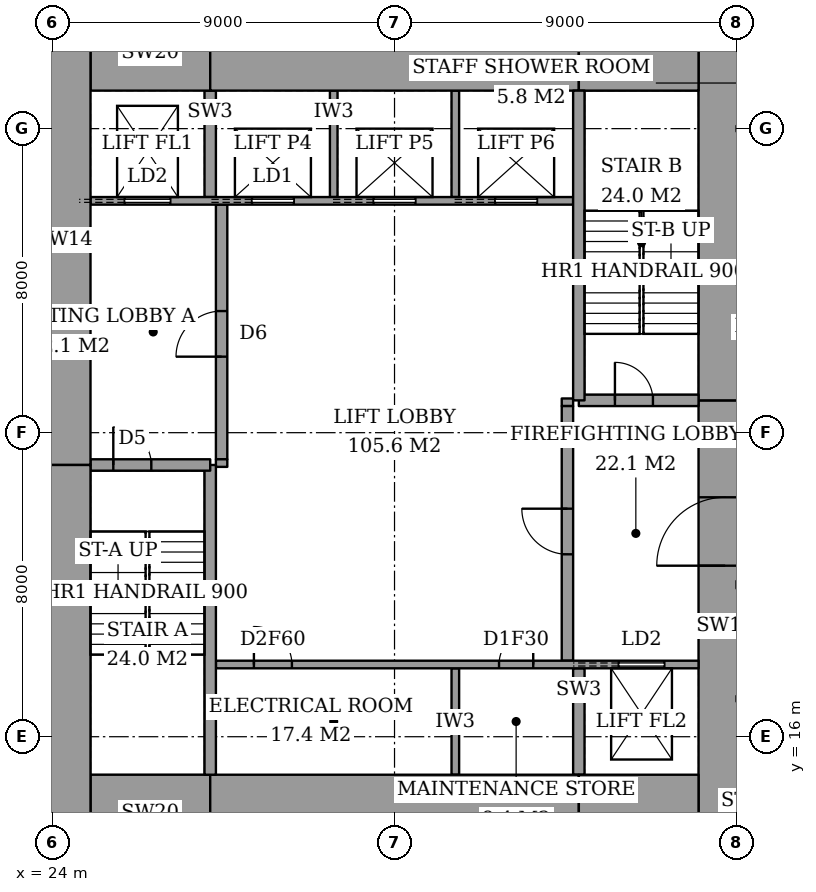
"""IFC4 building model, lengths in metres.
Left out: names, types, materials, properties, quantities, classifications, styles, units other than length and angle.
Written with IfcOpenShell. Run it as: python <this file> out.ifc"""

import sys

from ifc_helpers import new_model, si_unit, direction, frame, frame_2d, origin, place, context, subcontext, project, spatial, rectangle, extrude, element, fill, save


model = new_model("IFC4")
c1 = context("Model", 3, precision=1e-05, world=origin(), true_north=direction((0.0, 1.0)))
c2 = subcontext(c1, "Body", "Model", "MODEL_VIEW")
j1 = project(units=[si_unit("LENGTHUNIT", "METRE"), si_unit("PLANEANGLEUNIT", "RADIAN")], contexts=[c1])
p1 = place(None, origin())
s1 = spatial("IfcSite", under=j1, at=p1, CompositionType="ELEMENT")
p2 = place(p1, origin())
s2 = spatial("IfcBuilding", under=s1, at=p2, CompositionType="ELEMENT")
p3 = place(p2, frame((0.0, 0.0, 287.1)))
s3 = spatial("IfcBuildingStorey", under=s2, at=p3, CompositionType="ELEMENT", Elevation=287.1)
p4 = place(p3, frame((25.0, 14.0, 0.0), z_axis=(0.0, 0.0, 1.0), x_axis=(1.0, 0.0, 0.0)))
e1 = element("IfcWall", 1, at=p4, inside=s3, PredefinedType="SHEAR", context=c2, shape_type="SweptSolid", body=[
    extrude(rectangle(XDim=3.15, YDim=2.0, at=frame_2d((1.575, 0.0))), origin(), (0.0, 0.0, 1.0), 4.5),
])
p5 = place(p3, frame((28.15, 14.0, 0.0), z_axis=(0.0, 0.0, 1.0), x_axis=(1.0, 0.0, 0.0)))
e2 = element("IfcWall", 2, at=p5, inside=s3, PredefinedType="SHEAR", context=c2, shape_type="SweptSolid", body=[
    extrude(rectangle(XDim=9.7, YDim=2.0, at=frame_2d((4.85, 0.0))), origin(), (0.0, 0.0, 1.0), 4.5),
])
for number, where, z_axis, x_axis in (
    (3, (37.85, 14.0, 0.0), (0.0, 0.0, 1.0), (1.0, 0.0, 0.0)),
    (4, (25.0, 34.0, 0.0), (0.0, 0.0, 1.0), (1.0, 0.0, 0.0)),
):
    element("IfcWall", number, at=place(p3, frame(where, z_axis=z_axis, x_axis=x_axis)), inside=s3, PredefinedType="SHEAR", context=c2, shape_type="SweptSolid", body=[
        extrude(rectangle(XDim=3.15, YDim=2.0, at=frame_2d((1.575, 0.0))), origin(), (0.0, 0.0, 1.0), 4.5),
    ])
p6 = place(p3, frame((28.15, 34.0, 0.0), z_axis=(0.0, 0.0, 1.0), x_axis=(1.0, 0.0, 0.0)))
e5 = element("IfcWall", 5, at=p6, inside=s3, PredefinedType="SHEAR", context=c2, shape_type="SweptSolid", body=[
    extrude(rectangle(XDim=9.7, YDim=2.0, at=frame_2d((4.85, 0.0))), origin(), (0.0, 0.0, 1.0), 4.5),
])
p7 = place(p3, frame((37.85, 34.0, 0.0), z_axis=(0.0, 0.0, 1.0), x_axis=(1.0, 0.0, 0.0)))
e6 = element("IfcWall", 6, at=p7, inside=s3, PredefinedType="SHEAR", context=c2, shape_type="SweptSolid", body=[
    extrude(rectangle(XDim=3.15, YDim=2.0, at=frame_2d((1.575, 0.0))), origin(), (0.0, 0.0, 1.0), 4.5),
])
p8 = place(p3, frame((24.3, 13.0, 0.0), z_axis=(0.0, 0.0, 1.0), x_axis=(0.0, 1.0, 0.0)))
e7 = element("IfcWall", 7, at=p8, inside=s3, PredefinedType="SHEAR", context=c2, shape_type="SweptSolid", body=[
    extrude(rectangle(XDim=10.15, YDim=1.4, at=frame_2d((5.075, 0.0))), origin(), (0.0, 0.0, 1.0), 4.5),
])
p9 = place(p3, frame((24.3, 23.15, 0.0), z_axis=(0.0, 0.0, 1.0), x_axis=(0.0, 1.0, 0.0)))
e8 = element("IfcWall", 8, at=p9, inside=s3, PredefinedType="SHEAR", context=c2, shape_type="SweptSolid", body=[
    extrude(rectangle(XDim=11.85, YDim=1.4, at=frame_2d((5.925, 0.0))), origin(), (0.0, 0.0, 1.0), 4.5),
])
p10 = place(p3, frame((41.7, 13.0, 0.0), z_axis=(0.0, 0.0, 1.0), x_axis=(0.0, 1.0, 0.0)))
e9 = element("IfcWall", 9, at=p10, inside=s3, PredefinedType="SHEAR", context=c2, shape_type="SweptSolid", body=[
    extrude(rectangle(XDim=11.85, YDim=1.4, at=frame_2d((5.925, 0.0))), origin(), (0.0, 0.0, 1.0), 4.5),
])
p11 = place(p10, frame((7.5, 0.0, 0.0)))
e10 = element("IfcOpeningElement", 10, at=p11, cuts=e9, PredefinedType="OPENING", context=c2, shape_type="SweptSolid", body=[
    extrude(rectangle(XDim=1.8, YDim=2.4, at=frame_2d((0.9, 1.2))), frame((0.0, 0.71, 0.0), z_axis=(0.0, -1.0, 0.0), x_axis=(1.0, 0.0, 0.0)), (0.0, 0.0, 1.0), 1.42),
])
p12 = place(p3, frame((41.7, 24.85, 0.0), z_axis=(0.0, 0.0, 1.0), x_axis=(0.0, 1.0, 0.0)))
e11 = element("IfcWall", 11, at=p12, inside=s3, PredefinedType="SHEAR", context=c2, shape_type="SweptSolid", body=[
    extrude(rectangle(XDim=10.15, YDim=1.4, at=frame_2d((5.075, 0.0))), origin(), (0.0, 0.0, 1.0), 4.5),
])
p13 = place(p3, frame((28.15, 15.0, 0.0), z_axis=(0.0, 0.0, 1.0), x_axis=(0.0, 1.0, 0.0)))
e12 = element("IfcWall", 12, at=p13, inside=s3, PredefinedType="SHEAR", context=c2, shape_type="SweptSolid", body=[
    extrude(rectangle(XDim=8.15, YDim=0.3, at=frame_2d((4.075, 0.0))), origin(), (0.0, 0.0, 1.0), 4.5),
])
p14 = place(p3, frame((25.0, 23.15, 0.0), z_axis=(0.0, 0.0, 1.0), x_axis=(1.0, 0.0, 0.0)))
e13 = element("IfcWall", 13, at=p14, inside=s3, PredefinedType="SHEAR", context=c2, shape_type="SweptSolid", body=[
    extrude(rectangle(XDim=3.15, YDim=0.3, at=frame_2d((1.575, 0.0))), origin(), (0.0, 0.0, 1.0), 4.5),
])
p15 = place(p14, frame((0.6, 0.0, 0.0)))
e14 = element("IfcOpeningElement", 14, at=p15, cuts=e13, PredefinedType="OPENING", context=c2, shape_type="SweptSolid", body=[
    extrude(rectangle(XDim=1.0, YDim=2.1, at=frame_2d((0.5, 1.05))), frame((0.0, 0.16, 0.0), z_axis=(0.0, -1.0, 0.0), x_axis=(1.0, 0.0, 0.0)), (0.0, 0.0, 1.0), 0.32),
])
p16 = place(p3, frame((37.85, 24.85, 0.0), z_axis=(0.0, 0.0, 1.0), x_axis=(0.0, 1.0, 0.0)))
e15 = element("IfcWall", 15, at=p16, inside=s3, PredefinedType="SHEAR", context=c2, shape_type="SweptSolid", body=[
    extrude(rectangle(XDim=8.15, YDim=0.3, at=frame_2d((4.075, 0.0))), origin(), (0.0, 0.0, 1.0), 4.5),
])
p17 = place(p3, frame((37.85, 24.85, 0.0), z_axis=(0.0, 0.0, 1.0), x_axis=(1.0, 0.0, 0.0)))
e16 = element("IfcWall", 16, at=p17, inside=s3, PredefinedType="SHEAR", context=c2, shape_type="SweptSolid", body=[
    extrude(rectangle(XDim=3.15, YDim=0.3, at=frame_2d((1.575, 0.0))), origin(), (0.0, 0.0, 1.0), 4.5),
])
p18 = place(p17, frame((0.95, 0.0, 0.0)))
e17 = element("IfcOpeningElement", 17, at=p18, cuts=e16, PredefinedType="OPENING", context=c2, shape_type="SweptSolid", body=[
    extrude(rectangle(XDim=1.0, YDim=2.1, at=frame_2d((0.5, 1.05))), frame((0.0, 0.16, 0.0), z_axis=(0.0, -1.0, 0.0), x_axis=(1.0, 0.0, 0.0)), (0.0, 0.0, 1.0), 0.32),
])
p19 = place(p3, frame((28.45, 23.3, 0.0), z_axis=(0.0, 0.0, 1.0), x_axis=(0.0, 1.0, 0.0)))
e18 = element("IfcWall", 18, at=p19, inside=s3, PredefinedType="PARTITIONING", context=c2, shape_type="SweptSolid", body=[
    extrude(rectangle(XDim=6.7, YDim=0.3, at=frame_2d((3.35, 0.0))), origin(), (0.0, 0.0, 1.0), 4.5),
])
p20 = place(p19, frame((2.7, 0.0, 0.0)))
e19 = element("IfcOpeningElement", 19, at=p20, cuts=e18, PredefinedType="OPENING", context=c2, shape_type="SweptSolid", body=[
    extrude(rectangle(XDim=1.2, YDim=2.1, at=frame_2d((0.6, 1.05))), frame((0.0, 0.16, 0.0), z_axis=(0.0, -1.0, 0.0), x_axis=(1.0, 0.0, 0.0)), (0.0, 0.0, 1.0), 0.32),
])
p21 = place(p3, frame((37.55, 18.0, 0.0), z_axis=(0.0, 0.0, 1.0), x_axis=(0.0, 1.0, 0.0)))
e20 = element("IfcWall", 20, at=p21, inside=s3, PredefinedType="PARTITIONING", context=c2, shape_type="SweptSolid", body=[
    extrude(rectangle(XDim=6.7, YDim=0.3, at=frame_2d((3.35, 0.0))), origin(), (0.0, 0.0, 1.0), 4.5),
])
p22 = place(p21, frame((2.8, 0.0, 0.0)))
e21 = element("IfcOpeningElement", 21, at=p22, cuts=e20, PredefinedType="OPENING", context=c2, shape_type="SweptSolid", body=[
    extrude(rectangle(XDim=1.2, YDim=2.1, at=frame_2d((0.6, 1.05))), frame((0.0, 0.16, 0.0), z_axis=(0.0, -1.0, 0.0), x_axis=(1.0, 0.0, 0.0)), (0.0, 0.0, 1.0), 0.32),
])
p23 = place(p3, frame((28.3, 17.9, 0.0), z_axis=(0.0, 0.0, 1.0), x_axis=(1.0, 0.0, 0.0)))
e22 = element("IfcWall", 22, at=p23, inside=s3, PredefinedType="PARTITIONING", context=c2, shape_type="SweptSolid", body=[
    extrude(rectangle(XDim=12.7, YDim=0.2, at=frame_2d((6.35, 0.0))), origin(), (0.0, 0.0, 1.0), 4.5),
])
p24 = place(p23, frame((1.0, 0.0, 0.0)))
e23 = element("IfcOpeningElement", 23, at=p24, cuts=e22, PredefinedType="OPENING", context=c2, shape_type="SweptSolid", body=[
    extrude(rectangle(XDim=1.0, YDim=2.1, at=frame_2d((0.5, 1.05))), frame((0.0, 0.11, 0.0), z_axis=(0.0, -1.0, 0.0), x_axis=(1.0, 0.0, 0.0)), (0.0, 0.0, 1.0), 0.22),
])
p25 = place(p23, frame((7.45, 0.0, 0.0)))
e24 = element("IfcOpeningElement", 24, at=p25, cuts=e22, PredefinedType="OPENING", context=c2, shape_type="SweptSolid", body=[
    extrude(rectangle(XDim=0.9, YDim=2.1, at=frame_2d((0.45, 1.05))), frame((0.0, 0.11, 0.0), z_axis=(0.0, -1.0, 0.0), x_axis=(1.0, 0.0, 0.0)), (0.0, 0.0, 1.0), 0.22),
])
p26 = place(p23, frame((10.6, 0.0, 0.0)))
e25 = element("IfcOpeningElement", 25, at=p26, cuts=e22, PredefinedType="OPENING", context=c2, shape_type="SweptSolid", body=[
    extrude(rectangle(XDim=1.2, YDim=2.1, at=frame_2d((0.6, 1.05))), frame((0.0, 0.11, 0.0), z_axis=(0.0, -1.0, 0.0), x_axis=(1.0, 0.0, 0.0)), (0.0, 0.0, 1.0), 0.22),
])
p27 = place(p3, frame((25.0, 30.1, 0.0), z_axis=(0.0, 0.0, 1.0), x_axis=(1.0, 0.0, 0.0)))
e26 = element("IfcWall", 26, at=p27, inside=s3, PredefinedType="PARTITIONING", context=c2, shape_type="SweptSolid", body=[
    extrude(rectangle(XDim=12.7, YDim=0.2, at=frame_2d((6.35, 0.0))), origin(), (0.0, 0.0, 1.0), 4.5),
])
p28 = place(p27, frame((4.25, 0.0, 0.0)))
e27 = element("IfcOpeningElement", 27, at=p28, cuts=e26, PredefinedType="OPENING", context=c2, shape_type="SweptSolid", body=[
    extrude(rectangle(XDim=1.1, YDim=2.1, at=frame_2d((0.55, 1.05))), frame((0.0, 0.11, 0.0), z_axis=(0.0, -1.0, 0.0), x_axis=(1.0, 0.0, 0.0)), (0.0, 0.0, 1.0), 0.22),
])
p29 = place(p27, frame((7.45, 0.0, 0.0)))
e28 = element("IfcOpeningElement", 28, at=p29, cuts=e26, PredefinedType="OPENING", context=c2, shape_type="SweptSolid", body=[
    extrude(rectangle(XDim=1.1, YDim=2.1, at=frame_2d((0.55, 1.05))), frame((0.0, 0.11, 0.0), z_axis=(0.0, -1.0, 0.0), x_axis=(1.0, 0.0, 0.0)), (0.0, 0.0, 1.0), 0.22),
])
p30 = place(p27, frame((10.65, 0.0, 0.0)))
e29 = element("IfcOpeningElement", 29, at=p30, cuts=e26, PredefinedType="OPENING", context=c2, shape_type="SweptSolid", body=[
    extrude(rectangle(XDim=1.1, YDim=2.1, at=frame_2d((0.55, 1.05))), frame((0.0, 0.11, 0.0), z_axis=(0.0, -1.0, 0.0), x_axis=(1.0, 0.0, 0.0)), (0.0, 0.0, 1.0), 0.22),
])
p31 = place(p27, frame((0.9, 0.0, 0.0)))
e30 = element("IfcOpeningElement", 30, at=p31, cuts=e26, PredefinedType="OPENING", context=c2, shape_type="SweptSolid", body=[
    extrude(rectangle(XDim=1.2, YDim=2.1, at=frame_2d((0.6, 1.05))), frame((0.0, 0.11, 0.0), z_axis=(0.0, -1.0, 0.0), x_axis=(1.0, 0.0, 0.0)), (0.0, 0.0, 1.0), 0.22),
])
p32 = place(p3, frame((34.6, 15.0, 0.0), z_axis=(0.0, 0.0, 1.0), x_axis=(0.0, 1.0, 0.0)))
e31 = element("IfcWall", 31, at=p32, inside=s3, PredefinedType="PARTITIONING", context=c2, shape_type="SweptSolid", body=[
    extrude(rectangle(XDim=2.8, YDim=0.2, at=frame_2d((1.4, 0.0))), origin(), (0.0, 0.0, 1.0), 4.5),
])
p33 = place(p3, frame((37.85, 15.0, 0.0), z_axis=(0.0, 0.0, 1.0), x_axis=(0.0, 1.0, 0.0)))
e32 = element("IfcWall", 32, at=p33, inside=s3, PredefinedType="SHEAR", context=c2, shape_type="SweptSolid", body=[
    extrude(rectangle(XDim=2.8, YDim=0.3, at=frame_2d((1.4, 0.0))), origin(), (0.0, 0.0, 1.0), 4.5),
])
for number, where, z_axis, x_axis in (
    (33, (31.4, 30.2, 0.0), (0.0, 0.0, 1.0), (0.0, 1.0, 0.0)),
    (34, (34.6, 30.2, 0.0), (0.0, 0.0, 1.0), (0.0, 1.0, 0.0)),
):
    element("IfcWall", number, at=place(p3, frame(where, z_axis=z_axis, x_axis=x_axis)), inside=s3, PredefinedType="PARTITIONING", context=c2, shape_type="SweptSolid", body=[
        extrude(rectangle(XDim=2.8, YDim=0.2, at=frame_2d((1.4, 0.0))), origin(), (0.0, 0.0, 1.0), 4.5),
    ])
p34 = place(p3, frame((28.15, 30.2, 0.0), z_axis=(0.0, 0.0, 1.0), x_axis=(0.0, 1.0, 0.0)))
e35 = element("IfcWall", 35, at=p34, inside=s3, PredefinedType="SHEAR", context=c2, shape_type="SweptSolid", body=[
    extrude(rectangle(XDim=2.8, YDim=0.3, at=frame_2d((1.4, 0.0))), origin(), (0.0, 0.0, 1.0), 4.5),
])
for number, where, z_axis, x_axis in (
    (36, (28.3, 23.2, 0.0), (0.0, 0.0, 1.0), (1.0, 0.0, 0.0)),
    (37, (37.4, 24.8, 0.0), (0.0, 0.0, 1.0), (1.0, 0.0, 0.0)),
):
    element("IfcWall", number, at=place(p3, frame(where, z_axis=z_axis, x_axis=x_axis)), inside=s3, PredefinedType="PARTITIONING", context=c2, shape_type="SweptSolid", body=[
        extrude(rectangle(XDim=0.3, YDim=0.2, at=frame_2d((0.15, 0.0))), origin(), (0.0, 0.0, 1.0), 4.5),
    ])
p35 = place(p15, origin())
e38 = element("IfcDoor", 38, at=p35, inside=s3, OperationType="SINGLE_SWING_RIGHT", PredefinedType="DOOR", context=c2, shape_type="SweptSolid", body=[
    extrude(rectangle(XDim=1.0, YDim=2.1, at=frame_2d((0.5, 1.05))), frame((0.0, 0.025, 0.0), z_axis=(0.0, -1.0, 0.0), x_axis=(1.0, 0.0, 0.0)), (0.0, 0.0, 1.0), 0.05),
])
fill(e14, e38)
p36 = place(p18, origin())
e39 = element("IfcDoor", 39, at=p36, inside=s3, OperationType="SINGLE_SWING_RIGHT", PredefinedType="DOOR", context=c2, shape_type="SweptSolid", body=[
    extrude(rectangle(XDim=1.0, YDim=2.1, at=frame_2d((0.5, 1.05))), frame((0.0, 0.025, 0.0), z_axis=(0.0, -1.0, 0.0), x_axis=(1.0, 0.0, 0.0)), (0.0, 0.0, 1.0), 0.05),
])
fill(e17, e39)
p37 = place(p20, origin())
e40 = element("IfcDoor", 40, at=p37, inside=s3, OperationType="SINGLE_SWING_RIGHT", PredefinedType="DOOR", context=c2, shape_type="SweptSolid", body=[
    extrude(rectangle(XDim=1.2, YDim=2.1, at=frame_2d((0.6, 1.05))), frame((0.0, 0.025, 0.0), z_axis=(0.0, -1.0, 0.0), x_axis=(1.0, 0.0, 0.0)), (0.0, 0.0, 1.0), 0.05),
])
fill(e19, e40)
p38 = place(p22, origin())
e41 = element("IfcDoor", 41, at=p38, inside=s3, OperationType="SINGLE_SWING_LEFT", PredefinedType="DOOR", context=c2, shape_type="SweptSolid", body=[
    extrude(rectangle(XDim=1.2, YDim=2.1, at=frame_2d((0.6, 1.05))), frame((0.0, 0.025, 0.0), z_axis=(0.0, -1.0, 0.0), x_axis=(1.0, 0.0, 0.0)), (0.0, 0.0, 1.0), 0.05),
])
fill(e21, e41)
p39 = place(p11, origin())
e42 = element("IfcDoor", 42, at=p39, inside=s3, OperationType="DOUBLE_DOOR_DOUBLE_SWING", PredefinedType="DOOR", context=c2, shape_type="SweptSolid", body=[
    extrude(rectangle(XDim=1.8, YDim=2.4, at=frame_2d((0.9, 1.2))), frame((0.0, 0.025, 0.0), z_axis=(0.0, -1.0, 0.0), x_axis=(1.0, 0.0, 0.0)), (0.0, 0.0, 1.0), 0.05),
])
fill(e10, e42)
p40 = place(p24, origin())
e43 = element("IfcDoor", 43, at=p40, inside=s3, OperationType="SINGLE_SWING_RIGHT", PredefinedType="DOOR", context=c2, shape_type="SweptSolid", body=[
    extrude(rectangle(XDim=1.0, YDim=2.1, at=frame_2d((0.5, 1.05))), frame((0.0, 0.025, 0.0), z_axis=(0.0, -1.0, 0.0), x_axis=(1.0, 0.0, 0.0)), (0.0, 0.0, 1.0), 0.05),
])
fill(e23, e43)
p41 = place(p25, origin())
e44 = element("IfcDoor", 44, at=p41, inside=s3, OperationType="SINGLE_SWING_LEFT", PredefinedType="DOOR", context=c2, shape_type="SweptSolid", body=[
    extrude(rectangle(XDim=0.9, YDim=2.1, at=frame_2d((0.45, 1.05))), frame((0.0, 0.025, 0.0), z_axis=(0.0, -1.0, 0.0), x_axis=(1.0, 0.0, 0.0)), (0.0, 0.0, 1.0), 0.05),
])
fill(e24, e44)
p42 = place(p28, origin())
e45 = element("IfcDoor", 45, at=p42, inside=s3, OperationType="SLIDING_TO_LEFT", PredefinedType="DOOR", context=c2, shape_type="SweptSolid", body=[
    extrude(rectangle(XDim=1.1, YDim=2.1, at=frame_2d((0.55, 1.05))), frame((0.0, 0.025, 0.0), z_axis=(0.0, -1.0, 0.0), x_axis=(1.0, 0.0, 0.0)), (0.0, 0.0, 1.0), 0.05),
])
fill(e27, e45)
p43 = place(p29, origin())
e46 = element("IfcDoor", 46, at=p43, inside=s3, OperationType="SLIDING_TO_LEFT", PredefinedType="DOOR", context=c2, shape_type="SweptSolid", body=[
    extrude(rectangle(XDim=1.1, YDim=2.1, at=frame_2d((0.55, 1.05))), frame((0.0, 0.025, 0.0), z_axis=(0.0, -1.0, 0.0), x_axis=(1.0, 0.0, 0.0)), (0.0, 0.0, 1.0), 0.05),
])
fill(e28, e46)
p44 = place(p30, origin())
e47 = element("IfcDoor", 47, at=p44, inside=s3, OperationType="SLIDING_TO_LEFT", PredefinedType="DOOR", context=c2, shape_type="SweptSolid", body=[
    extrude(rectangle(XDim=1.1, YDim=2.1, at=frame_2d((0.55, 1.05))), frame((0.0, 0.025, 0.0), z_axis=(0.0, -1.0, 0.0), x_axis=(1.0, 0.0, 0.0)), (0.0, 0.0, 1.0), 0.05),
])
fill(e29, e47)
p45 = place(p31, origin())
e48 = element("IfcDoor", 48, at=p45, inside=s3, OperationType="SLIDING_TO_LEFT", PredefinedType="DOOR", context=c2, shape_type="SweptSolid", body=[
    extrude(rectangle(XDim=1.2, YDim=2.1, at=frame_2d((0.6, 1.05))), frame((0.0, 0.025, 0.0), z_axis=(0.0, -1.0, 0.0), x_axis=(1.0, 0.0, 0.0)), (0.0, 0.0, 1.0), 0.05),
])
fill(e30, e48)
p46 = place(p26, origin())
e49 = element("IfcDoor", 49, at=p46, inside=s3, OperationType="SLIDING_TO_LEFT", PredefinedType="DOOR", context=c2, shape_type="SweptSolid", body=[
    extrude(rectangle(XDim=1.2, YDim=2.1, at=frame_2d((0.6, 1.05))), frame((0.0, 0.025, 0.0), z_axis=(0.0, -1.0, 0.0), x_axis=(1.0, 0.0, 0.0)), (0.0, 0.0, 1.0), 0.05),
])
fill(e25, e49)
save(model, sys.argv[1])
